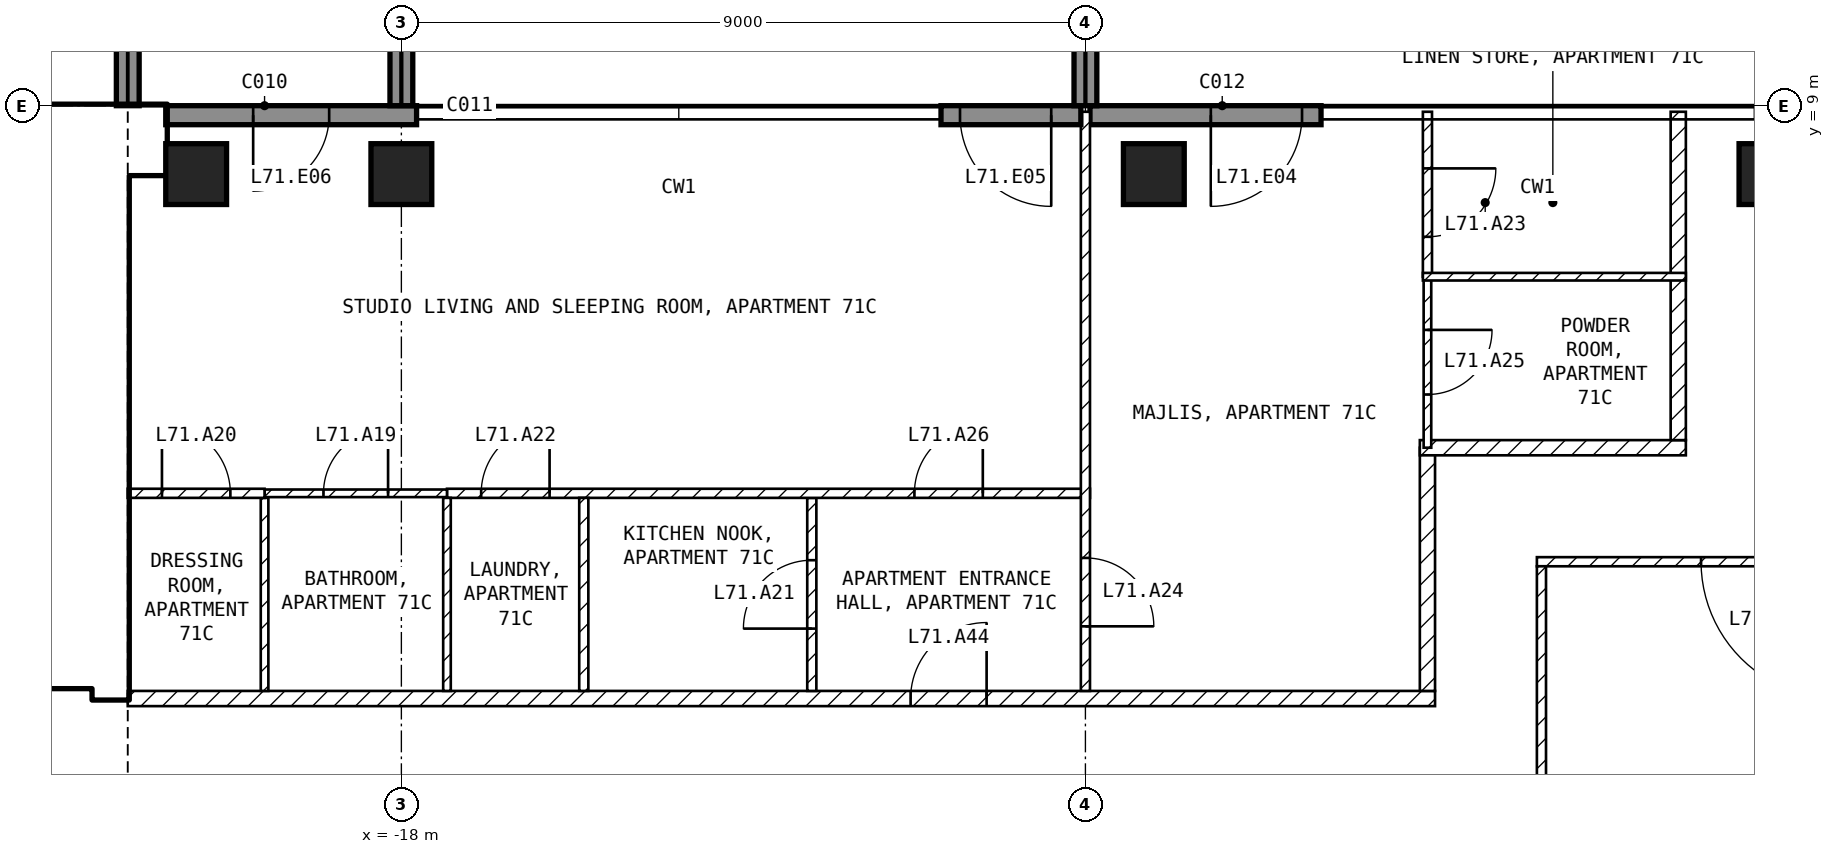
"""IFC4 building model, lengths in metres.
Left out: names, types, materials, properties, quantities, classifications, styles, units other than length and angle.
Written with IfcOpenShell. Run it as: python <this file> out.ifc"""

import sys

from ifc_helpers import new_model, si_unit, direction, frame, frame_2d, origin, origin_2d, place, context, subcontext, project, spatial, rectangle, extrude, element, fill, save


model = new_model("IFC4")
c1 = context("Model", 3, precision=1e-05, world=origin(), true_north=direction((0.0, 1.0)))
c2 = subcontext(c1, "Body", "Model", "MODEL_VIEW")
j1 = project(units=[si_unit("LENGTHUNIT", "METRE"), si_unit("PLANEANGLEUNIT", "RADIAN")], contexts=[c1])
p1 = place(None, origin())
s1 = spatial("IfcSite", under=j1, at=p1, CompositionType="ELEMENT")
p2 = place(p1, origin())
s2 = spatial("IfcBuilding", under=s1, at=p2, CompositionType="ELEMENT")
p3 = place(p2, frame((0.0, 0.0, 278.0)))
s3 = spatial("IfcBuildingStorey", under=s2, at=p3, CompositionType="ELEMENT", Elevation=278.0)
for number, where, z_axis, x_axis in (
    (1, (-20.7, 8.1, -0.25), (0.0, 0.0, 1.0), (1.0, 0.0, 0.0)),
    (2, (-18.0, 8.1, -0.25), (0.0, 0.0, 1.0), (1.0, 0.0, 0.0)),
    (3, (-8.1, 8.1, -0.25), (0.0, 0.0, 1.0), (1.0, 0.0, 0.0)),
    (4, (0.0, 8.1, -0.25), (0.0, 0.0, 1.0), (1.0, 0.0, 0.0)),
):
    element("IfcColumn", number, at=place(p3, frame(where, z_axis=z_axis, x_axis=x_axis)), inside=s3, PredefinedType="COLUMN", context=c2, shape_type="SweptSolid", body=[
        extrude(rectangle(XDim=0.8, YDim=0.8, at=origin_2d()), origin(), (0.0, 0.0, 1.0), 3.5),
    ])
p4 = place(p3, frame((-5.9, 8.875, 0.0), z_axis=(0.0, 0.0, 1.0), x_axis=(-1.0, 0.0, 0.0)))
e5 = element("IfcWall", 5, at=p4, inside=s3, PredefinedType="SOLIDWALL", context=c2, shape_type="SweptSolid", body=[
    extrude(rectangle(XDim=3.04, YDim=0.25, at=frame_2d((1.52, 0.0))), origin(), (0.0, 0.0, 1.0), 3.25),
])
p5 = place(p4, frame((0.25, 0.0, 0.0)))
e6 = element("IfcOpeningElement", 6, at=p5, cuts=e5, PredefinedType="OPENING", context=c2, shape_type="SweptSolid", body=[
    extrude(rectangle(XDim=1.2, YDim=2.4, at=frame_2d((0.6, 1.2))), frame((0.0, 0.135, 0.0), z_axis=(0.0, -1.0, 0.0), x_axis=(1.0, 0.0, 0.0)), (0.0, 0.0, 1.0), 0.27),
])
p6 = place(p3, frame((-9.06, 8.875, 0.0), z_axis=(0.0, 0.0, 1.0), x_axis=(-1.0, 0.0, 0.0)))
e7 = element("IfcWall", 7, at=p6, inside=s3, PredefinedType="SOLIDWALL", context=c2, shape_type="SweptSolid", body=[
    extrude(rectangle(XDim=1.84, YDim=0.25, at=frame_2d((0.92, 0.0))), origin(), (0.0, 0.0, 1.0), 3.25),
])
p7 = place(p6, frame((0.39, 0.0, 0.0)))
e8 = element("IfcOpeningElement", 8, at=p7, cuts=e7, PredefinedType="OPENING", context=c2, shape_type="SweptSolid", body=[
    extrude(rectangle(XDim=1.2, YDim=2.4, at=frame_2d((0.6, 1.2))), frame((0.0, 0.135, 0.0), z_axis=(0.0, -1.0, 0.0), x_axis=(1.0, 0.0, 0.0)), (0.0, 0.0, 1.0), 0.27),
])
p8 = place(p3, frame((-17.8, 8.875, 0.0), z_axis=(0.0, 0.0, 1.0), x_axis=(-1.0, 0.0, 0.0)))
e9 = element("IfcWall", 9, at=p8, inside=s3, PredefinedType="SOLIDWALL", context=c2, shape_type="SweptSolid", body=[
    extrude(rectangle(XDim=3.3, YDim=0.25, at=frame_2d((1.65, 0.0))), origin(), (0.0, 0.0, 1.0), 3.25),
])
p9 = place(p8, frame((1.15, 0.0, 0.0)))
e10 = element("IfcOpeningElement", 10, at=p9, cuts=e9, PredefinedType="OPENING", context=c2, shape_type="SweptSolid", body=[
    extrude(rectangle(XDim=1.0, YDim=2.4, at=frame_2d((0.5, 1.2))), frame((0.0, 0.135, 0.0), z_axis=(0.0, -1.0, 0.0), x_axis=(1.0, 0.0, 0.0)), (0.0, 0.0, 1.0), 0.27),
])
for number, where, z_axis, x_axis in (
    (11, (-21.6, 9.0, 0.0), (0.0, 0.0, 1.0), (0.0, 1.0, 0.0)),
    (12, (-18.0, 9.0, 0.0), (0.0, 0.0, 1.0), (0.0, 1.0, 0.0)),
    (13, (-9.0, 9.0, 0.0), (0.0, 0.0, 1.0), (0.0, 1.0, 0.0)),
):
    element("IfcWall", number, at=place(p3, frame(where, z_axis=z_axis, x_axis=x_axis)), inside=s3, PredefinedType="SOLIDWALL", context=c2, shape_type="SweptSolid", body=[
        extrude(rectangle(XDim=2.7, YDim=0.3, at=frame_2d((1.35, 0.0))), origin(), (0.0, 0.0, 1.0), 3.25),
    ])
p10 = place(p3, frame((-29.75, 8.55, 0.0), z_axis=(0.0, 0.0, 1.0), x_axis=(1.0, 0.0, 0.0)))
e14 = element("IfcWall", 14, at=p10, inside=s3, PredefinedType="SHEAR", context=c2, shape_type="SweptSolid", body=[
    extrude(rectangle(XDim=8.65, YDim=0.9, at=frame_2d((4.325, 0.0))), origin(), (0.0, 0.0, 1.0), 3.25),
])
p11 = place(p3, frame((-21.825, 1.2, 0.0), z_axis=(0.0, 0.0, 1.0), x_axis=(0.0, 1.0, 0.0)))
e15 = element("IfcWall", 15, at=p11, inside=s3, PredefinedType="SHEAR", context=c2, shape_type="SweptSolid", body=[
    extrude(rectangle(XDim=6.9, YDim=0.45, at=frame_2d((3.45, 0.0))), origin(), (0.0, 0.0, 1.0), 3.25),
])
p12 = place(p3, frame((-33.35, 1.45, 0.0), z_axis=(0.0, 0.0, 1.0), x_axis=(1.0, 0.0, 0.0)))
e16 = element("IfcWall", 16, at=p12, inside=s3, PredefinedType="SOLIDWALL", context=c2, shape_type="SweptSolid", body=[
    extrude(rectangle(XDim=11.3, YDim=0.2, at=frame_2d((5.65, 0.0))), origin(), (0.0, 0.0, 1.0), 3.25),
])
p13 = place(p12, frame((9.55, 0.0, 0.0)))
e17 = element("IfcOpeningElement", 17, at=p13, cuts=e16, PredefinedType="OPENING", context=c2, shape_type="SweptSolid", body=[
    extrude(rectangle(XDim=1.0, YDim=2.1, at=frame_2d((0.5, 1.05))), frame((0.0, 0.11, 0.0), z_axis=(0.0, -1.0, 0.0), x_axis=(1.0, 0.0, 0.0)), (0.0, 0.0, 1.0), 0.22),
])
p14 = place(p12, frame((7.05, 0.0, 0.0)))
e18 = element("IfcOpeningElement", 18, at=p14, cuts=e16, PredefinedType="OPENING", context=c2, shape_type="SweptSolid", body=[
    extrude(rectangle(XDim=1.0, YDim=2.1, at=frame_2d((0.5, 1.05))), frame((0.0, 0.11, 0.0), z_axis=(0.0, -1.0, 0.0), x_axis=(1.0, 0.0, 0.0)), (0.0, 0.0, 1.0), 0.22),
])
p15 = place(p12, frame((1.175, 0.0, 0.0)))
e19 = element("IfcOpeningElement", 19, at=p15, cuts=e16, PredefinedType="OPENING", context=c2, shape_type="SweptSolid", body=[
    extrude(rectangle(XDim=0.9, YDim=2.1, at=frame_2d((0.45, 1.05))), frame((0.0, 0.11, 0.0), z_axis=(0.0, -1.0, 0.0), x_axis=(1.0, 0.0, 0.0)), (0.0, 0.0, 1.0), 0.22),
])
p16 = place(p3, frame((-28.35, 5.15, 0.0), z_axis=(0.0, 0.0, 1.0), x_axis=(1.0, 0.0, 0.0)))
e20 = element("IfcWall", 20, at=p16, inside=s3, PredefinedType="SOLIDWALL", context=c2, shape_type="SweptSolid", body=[
    extrude(rectangle(XDim=6.3, YDim=0.2, at=frame_2d((3.15, 0.0))), origin(), (0.0, 0.0, 1.0), 3.25),
])
p17 = place(p16, frame((5.1, 0.0, 0.0)))
e21 = element("IfcOpeningElement", 21, at=p17, cuts=e20, PredefinedType="OPENING", context=c2, shape_type="SweptSolid", body=[
    extrude(rectangle(XDim=1.0, YDim=2.1, at=frame_2d((0.5, 1.05))), frame((0.0, 0.11, 0.0), z_axis=(0.0, -1.0, 0.0), x_axis=(1.0, 0.0, 0.0)), (0.0, 0.0, 1.0), 0.22),
])
p18 = place(p3, frame((3.06, 3.0, 0.0), z_axis=(0.0, 0.0, 1.0), x_axis=(-1.0, 0.0, 0.0)))
e22 = element("IfcWall", 22, at=p18, inside=s3, PredefinedType="PARTITIONING", context=c2, shape_type="SweptSolid", body=[
    extrude(rectangle(XDim=6.12, YDim=0.12, at=frame_2d((3.06, 0.0))), origin(), (0.0, 0.0, 1.0), 3.25),
])
p19 = place(p18, frame((2.16, 0.0, 0.0)))
e23 = element("IfcOpeningElement", 23, at=p19, cuts=e22, PredefinedType="OPENING", context=c2, shape_type="SweptSolid", body=[
    extrude(rectangle(XDim=1.8, YDim=2.1, at=frame_2d((0.9, 1.05))), frame((0.0, 0.07, 0.0), z_axis=(0.0, -1.0, 0.0), x_axis=(1.0, 0.0, 0.0)), (0.0, 0.0, 1.0), 0.14),
])
p20 = place(p3, frame((-3.0, 2.94, 0.0), z_axis=(0.0, 0.0, 1.0), x_axis=(0.0, -1.0, 0.0)))
e24 = element("IfcWall", 24, at=p20, inside=s3, PredefinedType="PARTITIONING", context=c2, shape_type="SweptSolid", body=[
    extrude(rectangle(XDim=5.88, YDim=0.12, at=frame_2d((2.94, 0.0))), origin(), (0.0, 0.0, 1.0), 3.25),
])
p21 = place(p3, frame((-21.6, 1.2, 0.0), z_axis=(0.0, 0.0, 1.0), x_axis=(1.0, 0.0, 0.0)))
e25 = element("IfcWall", 25, at=p21, inside=s3, PredefinedType="PARTITIONING", context=c2, shape_type="SweptSolid", body=[
    extrude(rectangle(XDim=17.2, YDim=0.2, at=frame_2d((8.6, 0.0))), origin(), (0.0, 0.0, 1.0), 3.25),
])
p22 = place(p21, frame((10.3, 0.0, 0.0)))
e26 = element("IfcOpeningElement", 26, at=p22, cuts=e25, PredefinedType="OPENING", context=c2, shape_type="SweptSolid", body=[
    extrude(rectangle(XDim=1.0, YDim=2.1, at=frame_2d((0.5, 1.05))), frame((0.0, 0.11, 0.0), z_axis=(0.0, -1.0, 0.0), x_axis=(1.0, 0.0, 0.0)), (0.0, 0.0, 1.0), 0.22),
])
p23 = place(p3, frame((-4.5, 1.3, 0.0), z_axis=(0.0, 0.0, 1.0), x_axis=(0.0, 1.0, 0.0)))
e27 = element("IfcWall", 27, at=p23, inside=s3, PredefinedType="PARTITIONING", context=c2, shape_type="SweptSolid", body=[
    extrude(rectangle(XDim=3.2, YDim=0.2, at=frame_2d((1.6, 0.0))), origin(), (0.0, 0.0, 1.0), 3.25),
])
p24 = place(p3, frame((-4.6, 4.5, 0.0), z_axis=(0.0, 0.0, 1.0), x_axis=(1.0, 0.0, 0.0)))
e28 = element("IfcWall", 28, at=p24, inside=s3, PredefinedType="PARTITIONING", context=c2, shape_type="SweptSolid", body=[
    extrude(rectangle(XDim=3.5, YDim=0.2, at=frame_2d((1.75, 0.0))), origin(), (0.0, 0.0, 1.0), 3.25),
])
p25 = place(p3, frame((-1.2, 4.6, 0.0), z_axis=(0.0, 0.0, 1.0), x_axis=(0.0, 1.0, 0.0)))
e29 = element("IfcWall", 29, at=p25, inside=s3, PredefinedType="PARTITIONING", context=c2, shape_type="SweptSolid", body=[
    extrude(rectangle(XDim=4.32, YDim=0.2, at=frame_2d((2.16, 0.0))), origin(), (0.0, 0.0, 1.0), 3.25),
])
p26 = place(p3, frame((-12.6, 1.3, 0.0), z_axis=(0.0, 0.0, 1.0), x_axis=(0.0, 1.0, 0.0)))
e30 = element("IfcWall", 30, at=p26, inside=s3, PredefinedType="PARTITIONING", context=c2, shape_type="SweptSolid", body=[
    extrude(rectangle(XDim=2.54, YDim=0.12, at=frame_2d((1.27, 0.0))), origin(), (0.0, 0.0, 1.0), 3.25),
])
p27 = place(p26, frame((0.82, 0.0, 0.0)))
e31 = element("IfcOpeningElement", 31, at=p27, cuts=e30, PredefinedType="OPENING", context=c2, shape_type="SweptSolid", body=[
    extrude(rectangle(XDim=0.9, YDim=2.1, at=frame_2d((0.45, 1.05))), frame((0.0, 0.07, 0.0), z_axis=(0.0, -1.0, 0.0), x_axis=(1.0, 0.0, 0.0)), (0.0, 0.0, 1.0), 0.14),
])
p28 = place(p3, frame((-17.4, 3.9, 0.0), z_axis=(0.0, 0.0, 1.0), x_axis=(1.0, 0.0, 0.0)))
e32 = element("IfcWall", 32, at=p28, inside=s3, PredefinedType="PARTITIONING", context=c2, shape_type="SweptSolid", body=[
    extrude(rectangle(XDim=8.46, YDim=0.12, at=frame_2d((4.23, 0.0))), origin(), (0.0, 0.0, 1.0), 3.25),
])
p29 = place(p28, frame((0.45, 0.0, 0.0)))
e33 = element("IfcOpeningElement", 33, at=p29, cuts=e32, PredefinedType="OPENING", context=c2, shape_type="SweptSolid", body=[
    extrude(rectangle(XDim=0.9, YDim=2.1, at=frame_2d((0.45, 1.05))), frame((0.0, 0.07, 0.0), z_axis=(0.0, -1.0, 0.0), x_axis=(1.0, 0.0, 0.0)), (0.0, 0.0, 1.0), 0.14),
])
p30 = place(p28, frame((6.15, 0.0, 0.0)))
e34 = element("IfcOpeningElement", 34, at=p30, cuts=e32, PredefinedType="OPENING", context=c2, shape_type="SweptSolid", body=[
    extrude(rectangle(XDim=0.9, YDim=2.1, at=frame_2d((0.45, 1.05))), frame((0.0, 0.07, 0.0), z_axis=(0.0, -1.0, 0.0), x_axis=(1.0, 0.0, 0.0)), (0.0, 0.0, 1.0), 0.14),
])
p31 = place(p3, frame((-9.0, 8.92, 0.0), z_axis=(0.0, 0.0, 1.0), x_axis=(0.0, -1.0, 0.0)))
e35 = element("IfcWall", 35, at=p31, inside=s3, PredefinedType="PARTITIONING", context=c2, shape_type="SweptSolid", body=[
    extrude(rectangle(XDim=7.62, YDim=0.12, at=frame_2d((3.81, 0.0))), origin(), (0.0, 0.0, 1.0), 3.25),
])
p32 = place(p31, frame((5.87, 0.0, 0.0)))
e36 = element("IfcOpeningElement", 36, at=p32, cuts=e35, PredefinedType="OPENING", context=c2, shape_type="SweptSolid", body=[
    extrude(rectangle(XDim=0.9, YDim=2.1, at=frame_2d((0.45, 1.05))), frame((0.0, 0.07, 0.0), z_axis=(0.0, -1.0, 0.0), x_axis=(1.0, 0.0, 0.0)), (0.0, 0.0, 1.0), 0.14),
])
p33 = place(p3, frame((-15.6, 1.3, 0.0), z_axis=(0.0, 0.0, 1.0), x_axis=(0.0, 1.0, 0.0)))
e37 = element("IfcWall", 37, at=p33, inside=s3, PredefinedType="PARTITIONING", context=c2, shape_type="SweptSolid", body=[
    extrude(rectangle(XDim=2.54, YDim=0.12, at=frame_2d((1.27, 0.0))), origin(), (0.0, 0.0, 1.0), 3.25),
])
for number, where, z_axis, x_axis in (
    (38, (-17.4, 1.3, 0.0), (0.0, 0.0, 1.0), (0.0, 1.0, 0.0)),
    (39, (-19.8, 1.3, 0.0), (0.0, 0.0, 1.0), (0.0, 1.0, 0.0)),
):
    element("IfcWall", number, at=place(p3, frame(where, z_axis=z_axis, x_axis=x_axis)), inside=s3, PredefinedType="PARTITIONING", context=c2, shape_type="SweptSolid", body=[
        extrude(rectangle(XDim=2.54, YDim=0.1, at=frame_2d((1.27, 0.0))), origin(), (0.0, 0.0, 1.0), 3.25),
    ])
p34 = place(p3, frame((-19.8, 3.9, 0.0), z_axis=(0.0, 0.0, 1.0), x_axis=(1.0, 0.0, 0.0)))
e40 = element("IfcWall", 40, at=p34, inside=s3, PredefinedType="PARTITIONING", context=c2, shape_type="SweptSolid", body=[
    extrude(rectangle(XDim=2.4, YDim=0.1, at=frame_2d((1.2, 0.0))), origin(), (0.0, 0.0, 1.0), 3.25),
])
p35 = place(p34, frame((0.775, 0.0, 0.0)))
e41 = element("IfcOpeningElement", 41, at=p35, cuts=e40, PredefinedType="OPENING", context=c2, shape_type="SweptSolid", body=[
    extrude(rectangle(XDim=0.85, YDim=2.1, at=frame_2d((0.425, 1.05))), frame((0.0, 0.06, 0.0), z_axis=(0.0, -1.0, 0.0), x_axis=(1.0, 0.0, 0.0)), (0.0, 0.0, 1.0), 0.12),
])
p36 = place(p3, frame((-21.6, 3.9, 0.0), z_axis=(0.0, 0.0, 1.0), x_axis=(1.0, 0.0, 0.0)))
e42 = element("IfcWall", 42, at=p36, inside=s3, PredefinedType="PARTITIONING", context=c2, shape_type="SweptSolid", body=[
    extrude(rectangle(XDim=1.8, YDim=0.12, at=frame_2d((0.9, 0.0))), origin(), (0.0, 0.0, 1.0), 3.25),
])
p37 = place(p36, frame((0.45, 0.0, 0.0)))
e43 = element("IfcOpeningElement", 43, at=p37, cuts=e42, PredefinedType="OPENING", context=c2, shape_type="SweptSolid", body=[
    extrude(rectangle(XDim=0.9, YDim=2.1, at=frame_2d((0.45, 1.05))), frame((0.0, 0.07, 0.0), z_axis=(0.0, -1.0, 0.0), x_axis=(1.0, 0.0, 0.0)), (0.0, 0.0, 1.0), 0.14),
])
p38 = place(p3, frame((-4.5, 6.75, 0.0), z_axis=(0.0, 0.0, 1.0), x_axis=(0.0, -1.0, 0.0)))
e44 = element("IfcWall", 44, at=p38, inside=s3, PredefinedType="PARTITIONING", context=c2, shape_type="SweptSolid", body=[
    extrude(rectangle(XDim=2.25, YDim=0.1, at=frame_2d((1.125, 0.0))), origin(), (0.0, 0.0, 1.0), 3.25),
])
p39 = place(p38, frame((0.7, 0.0, 0.0)))
e45 = element("IfcOpeningElement", 45, at=p39, cuts=e44, PredefinedType="OPENING", context=c2, shape_type="SweptSolid", body=[
    extrude(rectangle(XDim=0.85, YDim=2.1, at=frame_2d((0.425, 1.05))), frame((0.0, 0.06, 0.0), z_axis=(0.0, -1.0, 0.0), x_axis=(1.0, 0.0, 0.0)), (0.0, 0.0, 1.0), 0.12),
])
p40 = place(p3, frame((-4.5, 8.92, 0.0), z_axis=(0.0, 0.0, 1.0), x_axis=(0.0, -1.0, 0.0)))
e46 = element("IfcWall", 46, at=p40, inside=s3, PredefinedType="PARTITIONING", context=c2, shape_type="SweptSolid", body=[
    extrude(rectangle(XDim=2.17, YDim=0.12, at=frame_2d((1.085, 0.0))), origin(), (0.0, 0.0, 1.0), 3.25),
])
p41 = place(p40, frame((0.745, 0.0, 0.0)))
e47 = element("IfcOpeningElement", 47, at=p41, cuts=e46, PredefinedType="OPENING", context=c2, shape_type="SweptSolid", body=[
    extrude(rectangle(XDim=0.9, YDim=2.1, at=frame_2d((0.45, 1.05))), frame((0.0, 0.07, 0.0), z_axis=(0.0, -1.0, 0.0), x_axis=(1.0, 0.0, 0.0)), (0.0, 0.0, 1.0), 0.14),
])
p42 = place(p3, frame((-4.56, 6.75, 0.0), z_axis=(0.0, 0.0, 1.0), x_axis=(1.0, 0.0, 0.0)))
e48 = element("IfcWall", 48, at=p42, inside=s3, PredefinedType="PARTITIONING", context=c2, shape_type="SweptSolid", body=[
    extrude(rectangle(XDim=3.46, YDim=0.1, at=frame_2d((1.73, 0.0))), origin(), (0.0, 0.0, 1.0), 3.25),
])
p43 = place(p5, origin())
e49 = element("IfcDoor", 49, at=p43, inside=s3, OperationType="SINGLE_SWING_RIGHT", PredefinedType="DOOR", context=c2, shape_type="SweptSolid", body=[
    extrude(rectangle(XDim=1.2, YDim=2.4, at=frame_2d((0.6, 1.2))), frame((0.0, 0.025, 0.0), z_axis=(0.0, -1.0, 0.0), x_axis=(1.0, 0.0, 0.0)), (0.0, 0.0, 1.0), 0.05),
])
fill(e6, e49)
p44 = place(p7, origin())
e50 = element("IfcDoor", 50, at=p44, inside=s3, OperationType="SINGLE_SWING_LEFT", PredefinedType="DOOR", context=c2, shape_type="SweptSolid", body=[
    extrude(rectangle(XDim=1.2, YDim=2.4, at=frame_2d((0.6, 1.2))), frame((0.0, 0.025, 0.0), z_axis=(0.0, -1.0, 0.0), x_axis=(1.0, 0.0, 0.0)), (0.0, 0.0, 1.0), 0.05),
])
fill(e8, e50)
p45 = place(p9, origin())
e51 = element("IfcDoor", 51, at=p45, inside=s3, OperationType="SINGLE_SWING_RIGHT", PredefinedType="DOOR", context=c2, shape_type="SweptSolid", body=[
    extrude(rectangle(XDim=1.0, YDim=2.4, at=frame_2d((0.5, 1.2))), frame((0.0, 0.025, 0.0), z_axis=(0.0, -1.0, 0.0), x_axis=(1.0, 0.0, 0.0)), (0.0, 0.0, 1.0), 0.05),
])
fill(e10, e51)
p46 = place(p17, origin())
e52 = element("IfcDoor", 52, at=p46, inside=s3, OperationType="SINGLE_SWING_LEFT", PredefinedType="DOOR", context=c2, shape_type="SweptSolid", body=[
    extrude(rectangle(XDim=1.0, YDim=2.1, at=frame_2d((0.5, 1.05))), frame((0.0, 0.025, 0.0), z_axis=(0.0, -1.0, 0.0), x_axis=(1.0, 0.0, 0.0)), (0.0, 0.0, 1.0), 0.05),
])
fill(e21, e52)
p47 = place(p19, origin())
e53 = element("IfcDoor", 53, at=p47, inside=s3, OperationType="SINGLE_SWING_LEFT", PredefinedType="DOOR", context=c2, shape_type="SweptSolid", body=[
    extrude(rectangle(XDim=1.8, YDim=2.1, at=frame_2d((0.9, 1.05))), frame((0.0, 0.025, 0.0), z_axis=(0.0, -1.0, 0.0), x_axis=(1.0, 0.0, 0.0)), (0.0, 0.0, 1.0), 0.05),
])
fill(e23, e53)
p48 = place(p35, origin())
e54 = element("IfcDoor", 54, at=p48, inside=s3, OperationType="SINGLE_SWING_RIGHT", PredefinedType="DOOR", context=c2, shape_type="SweptSolid", body=[
    extrude(rectangle(XDim=0.85, YDim=2.1, at=frame_2d((0.425, 1.05))), frame((0.0, 0.025, 0.0), z_axis=(0.0, -1.0, 0.0), x_axis=(1.0, 0.0, 0.0)), (0.0, 0.0, 1.0), 0.05),
])
fill(e41, e54)
p49 = place(p37, origin())
e55 = element("IfcDoor", 55, at=p49, inside=s3, OperationType="SINGLE_SWING_LEFT", PredefinedType="DOOR", context=c2, shape_type="SweptSolid", body=[
    extrude(rectangle(XDim=0.9, YDim=2.1, at=frame_2d((0.45, 1.05))), frame((0.0, 0.025, 0.0), z_axis=(0.0, -1.0, 0.0), x_axis=(1.0, 0.0, 0.0)), (0.0, 0.0, 1.0), 0.05),
])
fill(e43, e55)
p50 = place(p27, origin())
e56 = element("IfcDoor", 56, at=p50, inside=s3, OperationType="SINGLE_SWING_LEFT", PredefinedType="DOOR", context=c2, shape_type="SweptSolid", body=[
    extrude(rectangle(XDim=0.9, YDim=2.1, at=frame_2d((0.45, 1.05))), frame((0.0, 0.025, 0.0), z_axis=(0.0, -1.0, 0.0), x_axis=(1.0, 0.0, 0.0)), (0.0, 0.0, 1.0), 0.05),
])
fill(e31, e56)
p51 = place(p29, origin())
e57 = element("IfcDoor", 57, at=p51, inside=s3, OperationType="SINGLE_SWING_RIGHT", PredefinedType="DOOR", context=c2, shape_type="SweptSolid", body=[
    extrude(rectangle(XDim=0.9, YDim=2.1, at=frame_2d((0.45, 1.05))), frame((0.0, 0.025, 0.0), z_axis=(0.0, -1.0, 0.0), x_axis=(1.0, 0.0, 0.0)), (0.0, 0.0, 1.0), 0.05),
])
fill(e33, e57)
p52 = place(p41, origin())
e58 = element("IfcDoor", 58, at=p52, inside=s3, OperationType="SINGLE_SWING_LEFT", PredefinedType="DOOR", context=c2, shape_type="SweptSolid", body=[
    extrude(rectangle(XDim=0.9, YDim=2.1, at=frame_2d((0.45, 1.05))), frame((0.0, 0.025, 0.0), z_axis=(0.0, -1.0, 0.0), x_axis=(1.0, 0.0, 0.0)), (0.0, 0.0, 1.0), 0.05),
])
fill(e47, e58)
p53 = place(p32, origin())
e59 = element("IfcDoor", 59, at=p53, inside=s3, OperationType="SINGLE_SWING_RIGHT", PredefinedType="DOOR", context=c2, shape_type="SweptSolid", body=[
    extrude(rectangle(XDim=0.9, YDim=2.1, at=frame_2d((0.45, 1.05))), frame((0.0, 0.025, 0.0), z_axis=(0.0, -1.0, 0.0), x_axis=(1.0, 0.0, 0.0)), (0.0, 0.0, 1.0), 0.05),
])
fill(e36, e59)
p54 = place(p39, origin())
e60 = element("IfcDoor", 60, at=p54, inside=s3, OperationType="SINGLE_SWING_LEFT", PredefinedType="DOOR", context=c2, shape_type="SweptSolid", body=[
    extrude(rectangle(XDim=0.85, YDim=2.1, at=frame_2d((0.425, 1.05))), frame((0.0, 0.025, 0.0), z_axis=(0.0, -1.0, 0.0), x_axis=(1.0, 0.0, 0.0)), (0.0, 0.0, 1.0), 0.05),
])
fill(e45, e60)
p55 = place(p30, origin())
e61 = element("IfcDoor", 61, at=p55, inside=s3, OperationType="SINGLE_SWING_RIGHT", PredefinedType="DOOR", context=c2, shape_type="SweptSolid", body=[
    extrude(rectangle(XDim=0.9, YDim=2.1, at=frame_2d((0.45, 1.05))), frame((0.0, 0.025, 0.0), z_axis=(0.0, -1.0, 0.0), x_axis=(1.0, 0.0, 0.0)), (0.0, 0.0, 1.0), 0.05),
])
fill(e34, e61)
p56 = place(p22, origin())
e62 = element("IfcDoor", 62, at=p56, inside=s3, OperationType="SINGLE_SWING_RIGHT", PredefinedType="DOOR", context=c2, shape_type="SweptSolid", body=[
    extrude(rectangle(XDim=1.0, YDim=2.1, at=frame_2d((0.5, 1.05))), frame((0.0, 0.025, 0.0), z_axis=(0.0, -1.0, 0.0), x_axis=(1.0, 0.0, 0.0)), (0.0, 0.0, 1.0), 0.05),
])
fill(e26, e62)
save(model, sys.argv[1])
